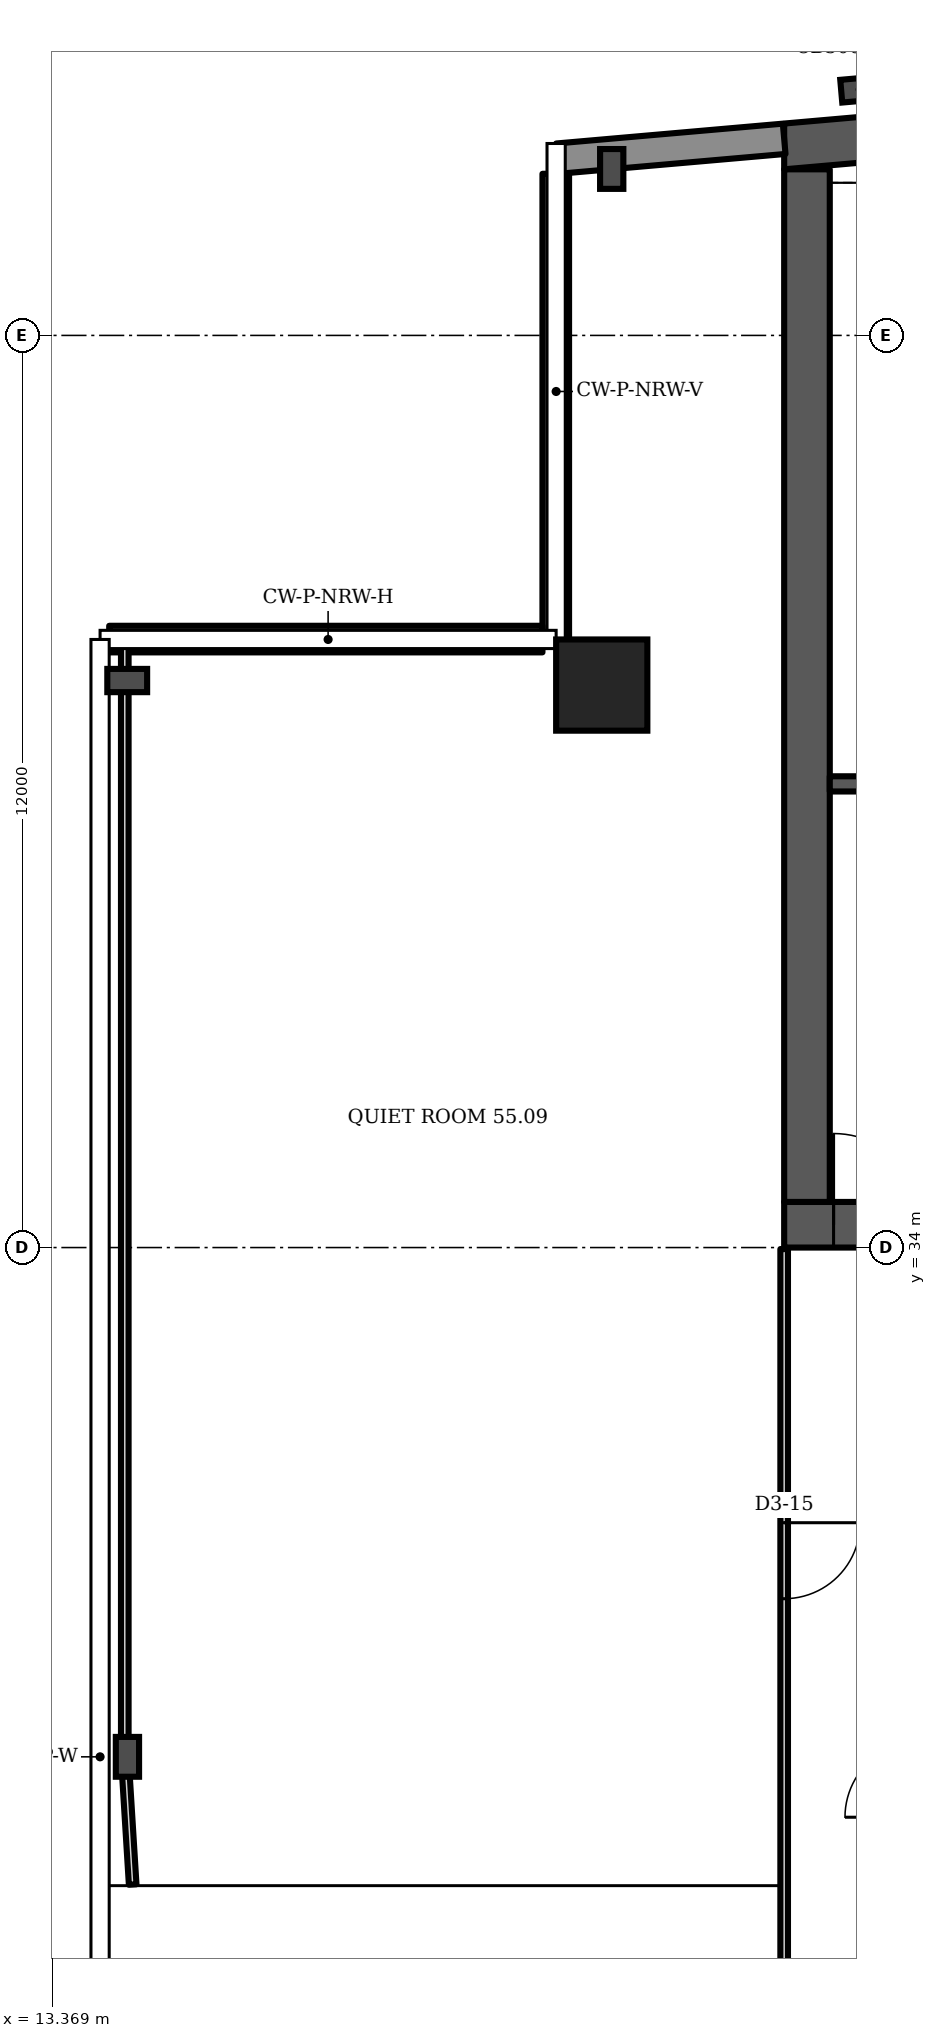
"""IFC4 building model, lengths in metres.
Left out: names, types, materials, properties, quantities, classifications, styles, units other than length and angle.
Written with IfcOpenShell. Run it as: python <this file> out.ifc"""

import sys

from ifc_helpers import new_model, si_unit, direction, frame, frame_2d, origin, origin_2d, place, context, subcontext, project, spatial, polyline, rectangle, i_section, outline, extrude, element, fill, save


model = new_model("IFC4")
c1 = context("Model", 3, precision=1e-05, world=origin(), true_north=direction((0.0, 1.0)))
c2 = subcontext(c1, "Body", "Model", "MODEL_VIEW")
j1 = project(units=[si_unit("LENGTHUNIT", "METRE"), si_unit("PLANEANGLEUNIT", "RADIAN")], contexts=[c1])
p1 = place(None, origin())
s1 = spatial("IfcSite", under=j1, at=p1, CompositionType="ELEMENT")
p2 = place(p1, origin())
s2 = spatial("IfcBuilding", under=s1, at=p2, CompositionType="ELEMENT")
p3 = place(p2, frame((0.0, 0.0, 221.5)))
s3 = spatial("IfcBuildingStorey", under=s2, at=p3, CompositionType="ELEMENT", Elevation=221.5)
p4 = place(p3, origin())
e1 = element("IfcWall", 1, at=p4, inside=s3, PredefinedType="SHEAR", context=c2, shape_type="SweptSolid", body=[
    extrude(outline(polyline([(23.0, 48.185), (40.5, 49.716), (58.0, 48.185), (58.0, 48.787), (40.5, 50.318), (23.0, 48.787), (23.0, 48.185)])), origin(), (0.0, 0.0, 1.0), 3.6),
])
p5 = place(p3, frame((23.0, 34.3, 0.0), z_axis=(0.0, 0.0, 1.0), x_axis=(1.0, 0.0, 0.0)))
e2 = element("IfcWall", 2, at=p5, inside=s3, PredefinedType="SHEAR", context=c2, shape_type="SweptSolid", body=[
    extrude(rectangle(XDim=35.0, YDim=0.6, at=frame_2d((17.5, 0.0))), origin(), (0.0, 0.0, 1.0), 3.6),
])
p6 = place(p5, frame((0.65, 0.0, 0.0)))
e3 = element("IfcOpeningElement", 3, at=p6, cuts=e2, PredefinedType="OPENING", context=c2, shape_type="SweptSolid", body=[
    extrude(rectangle(XDim=1.2, YDim=2.1, at=frame_2d((0.6, 1.05))), frame((0.0, 0.31, 0.0), z_axis=(0.0, -1.0, 0.0), x_axis=(1.0, 0.0, 0.0)), (0.0, 0.0, 1.0), 0.62),
])
p7 = place(p5, frame((7.717, 0.0, 0.0)))
e4 = element("IfcOpeningElement", 4, at=p7, cuts=e2, PredefinedType="OPENING", context=c2, shape_type="SweptSolid", body=[
    extrude(rectangle(XDim=1.1, YDim=2.1, at=frame_2d((0.55, 1.05))), frame((0.0, 0.31, 0.0), z_axis=(0.0, -1.0, 0.0), x_axis=(1.0, 0.0, 0.0)), (0.0, 0.0, 1.0), 0.62),
])
p8 = place(p5, frame((12.183, 0.0, 0.0)))
e5 = element("IfcOpeningElement", 5, at=p8, cuts=e2, PredefinedType="OPENING", context=c2, shape_type="SweptSolid", body=[
    extrude(rectangle(XDim=1.1, YDim=2.1, at=frame_2d((0.55, 1.05))), frame((0.0, 0.31, 0.0), z_axis=(0.0, -1.0, 0.0), x_axis=(1.0, 0.0, 0.0)), (0.0, 0.0, 1.0), 0.62),
])
p9 = place(p5, frame((9.8, 0.0, 0.0)))
e6 = element("IfcOpeningElement", 6, at=p9, cuts=e2, PredefinedType="OPENING", context=c2, shape_type="SweptSolid", body=[
    extrude(rectangle(XDim=1.4, YDim=2.1, at=frame_2d((0.7, 1.05))), frame((0.0, 0.31, 0.0), z_axis=(0.0, -1.0, 0.0), x_axis=(1.0, 0.0, 0.0)), (0.0, 0.0, 1.0), 0.62),
])
p10 = place(p5, frame((14.717, 0.0, 0.0)))
e7 = element("IfcOpeningElement", 7, at=p10, cuts=e2, PredefinedType="OPENING", context=c2, shape_type="SweptSolid", body=[
    extrude(rectangle(XDim=1.1, YDim=2.1, at=frame_2d((0.55, 1.05))), frame((0.0, 0.31, 0.0), z_axis=(0.0, -1.0, 0.0), x_axis=(1.0, 0.0, 0.0)), (0.0, 0.0, 1.0), 0.62),
])
p11 = place(p5, frame((16.95, 0.0, 0.0)))
e8 = element("IfcOpeningElement", 8, at=p11, cuts=e2, PredefinedType="OPENING", context=c2, shape_type="SweptSolid", body=[
    extrude(rectangle(XDim=1.1, YDim=2.1, at=frame_2d((0.55, 1.05))), frame((0.0, 0.31, 0.0), z_axis=(0.0, -1.0, 0.0), x_axis=(1.0, 0.0, 0.0)), (0.0, 0.0, 1.0), 0.62),
])
p12 = place(p5, frame((19.183, 0.0, 0.0)))
e9 = element("IfcOpeningElement", 9, at=p12, cuts=e2, PredefinedType="OPENING", context=c2, shape_type="SweptSolid", body=[
    extrude(rectangle(XDim=1.1, YDim=2.1, at=frame_2d((0.55, 1.05))), frame((0.0, 0.31, 0.0), z_axis=(0.0, -1.0, 0.0), x_axis=(1.0, 0.0, 0.0)), (0.0, 0.0, 1.0), 0.62),
])
p13 = place(p5, frame((26.15, 0.0, 0.0)))
e10 = element("IfcOpeningElement", 10, at=p13, cuts=e2, PredefinedType="OPENING", context=c2, shape_type="SweptSolid", body=[
    extrude(rectangle(XDim=1.2, YDim=2.1, at=frame_2d((0.6, 1.05))), frame((0.0, 0.31, 0.0), z_axis=(0.0, -1.0, 0.0), x_axis=(1.0, 0.0, 0.0)), (0.0, 0.0, 1.0), 0.62),
])
p14 = place(p5, frame((28.767, 0.0, 0.0)))
e11 = element("IfcOpeningElement", 11, at=p14, cuts=e2, PredefinedType="OPENING", context=c2, shape_type="SweptSolid", body=[
    extrude(rectangle(XDim=1.0, YDim=2.1, at=frame_2d((0.5, 1.05))), frame((0.0, 0.31, 0.0), z_axis=(0.0, -1.0, 0.0), x_axis=(1.0, 0.0, 0.0)), (0.0, 0.0, 1.0), 0.62),
])
p15 = place(p5, frame((33.083, 0.0, 0.0)))
e12 = element("IfcOpeningElement", 12, at=p15, cuts=e2, PredefinedType="OPENING", context=c2, shape_type="SweptSolid", body=[
    extrude(rectangle(XDim=1.0, YDim=2.1, at=frame_2d((0.5, 1.05))), frame((0.0, 0.31, 0.0), z_axis=(0.0, -1.0, 0.0), x_axis=(1.0, 0.0, 0.0)), (0.0, 0.0, 1.0), 0.62),
])
p16 = place(p5, frame((30.8, 0.0, 0.0)))
e13 = element("IfcOpeningElement", 13, at=p16, cuts=e2, PredefinedType="OPENING", context=c2, shape_type="SweptSolid", body=[
    extrude(rectangle(XDim=1.4, YDim=2.1, at=frame_2d((0.7, 1.05))), frame((0.0, 0.31, 0.0), z_axis=(0.0, -1.0, 0.0), x_axis=(1.0, 0.0, 0.0)), (0.0, 0.0, 1.0), 0.62),
])
p17 = place(p3, frame((23.3, 34.6, 0.0), z_axis=(0.0, 0.0, 1.0), x_axis=(0.0, 1.0, 0.0)))
e14 = element("IfcWall", 14, at=p17, inside=s3, PredefinedType="SHEAR", context=c2, shape_type="SweptSolid", body=[
    extrude(rectangle(XDim=13.585, YDim=0.6, at=frame_2d((6.792, 0.0))), origin(), (0.0, 0.0, 1.0), 3.6),
])
p18 = place(p3, frame((20.6, 41.4, 0.0), z_axis=(0.0, 0.0, 1.0), x_axis=(1.0, 0.0, 0.0)))
e15 = element("IfcColumn", 15, at=p18, inside=s3, PredefinedType="COLUMN", context=c2, shape_type="SweptSolid", body=[
    extrude(rectangle(XDim=1.2, YDim=1.2, at=origin_2d()), origin(), (0.0, 0.0, 1.0), 3.6),
])
for number, where, z_axis, x_axis in (
    (16, (20.731, 48.19, 0.0), (0.0, 0.0, 1.0), (-1.0, 0.0, 0.0)),
    (17, (14.357, 41.46, 0.0), (0.0, 0.0, 1.0), (0.0, 1.0, 0.0)),
    (18, (14.36, 27.3, 0.0), (0.0, 0.0, 1.0), (-1.0, 0.0, 0.0)),
):
    element("IfcColumn", number, at=place(p3, frame(where, z_axis=z_axis, x_axis=x_axis)), inside=s3, PredefinedType="COLUMN", context=c2, shape_type="SweptSolid", body=[
        extrude(i_section(OverallWidth=0.306, OverallDepth=0.524, WebThickness=0.021, FlangeThickness=0.04, FilletRadius=0.027, at=origin_2d()), origin(), (0.0, 0.0, 1.0), 3.6),
    ])
p19 = place(p3, frame((24.0, 49.235, 0.0), z_axis=(0.0, 0.0, 1.0), x_axis=(-0.087156, 0.996197, 0.0)))
e19 = element("IfcColumn", 19, at=p19, inside=s3, PredefinedType="COLUMN", context=c2, shape_type="SweptSolid", body=[
    extrude(i_section(OverallWidth=0.3, OverallDepth=0.5, WebThickness=0.014, FlangeThickness=0.028, FilletRadius=0.027, at=origin_2d()), origin(), (0.0, 0.0, 1.0), 3.6),
])
p20 = place(p3, frame((23.0, 48.587, 0.0), z_axis=(0.0, 0.0, 1.0), x_axis=(-0.996194, -0.087168, 0.0)))
e20 = element("IfcWall", 20, at=p20, inside=s3, PredefinedType="SOLIDWALL", context=c2, shape_type="SweptSolid", body=[
    extrude(rectangle(XDim=2.994, YDim=0.4, at=frame_2d((1.497, 0.0))), origin(), (0.0, 0.0, 1.0), 3.2),
])
p21 = place(p3, frame((19.995, 48.126, 0.0), z_axis=(0.0, 0.0, 1.0), x_axis=(0.0, -1.0, 0.0)))
e21 = element("IfcWall", 21, at=p21, inside=s3, PredefinedType="SOLIDWALL", context=c2, shape_type="SweptSolid", body=[
    extrude(rectangle(XDim=6.126, YDim=0.35, at=frame_2d((3.063, 0.0))), origin(), (0.0, 0.0, 1.0), 1.0),
])
p22 = place(p3, frame((19.82, 42.005, 0.0), z_axis=(0.0, 0.0, 1.0), x_axis=(-1.0, 0.0, 0.0)))
e22 = element("IfcWall", 22, at=p22, inside=s3, PredefinedType="SOLIDWALL", context=c2, shape_type="SweptSolid", body=[
    extrude(rectangle(XDim=5.7, YDim=0.35, at=frame_2d((2.85, 0.0))), origin(), (0.0, 0.0, 1.0), 1.0),
])
p23 = place(p3, frame((23.6, 40.1, 0.0), z_axis=(0.0, 0.0, 1.0), x_axis=(1.0, 0.0, 0.0)))
e23 = element("IfcWall", 23, at=p23, inside=s3, PredefinedType="SHEAR", context=c2, shape_type="SweptSolid", body=[
    extrude(rectangle(XDim=6.1, YDim=0.2, at=frame_2d((3.05, 0.0))), origin(), (0.0, 0.0, 1.0), 3.2),
])
p24 = place(p23, frame((3.325, 0.0, 0.0)))
e24 = element("IfcOpeningElement", 24, at=p24, cuts=e23, PredefinedType="OPENING", context=c2, shape_type="SweptSolid", body=[
    extrude(rectangle(XDim=1.2, YDim=2.1, at=frame_2d((0.6, 1.05))), frame((0.0, 0.11, 0.0), z_axis=(0.0, -1.0, 0.0), x_axis=(1.0, 0.0, 0.0)), (0.0, 0.0, 1.0), 0.22),
])
p25 = place(p23, frame((0.475, 0.0, 0.0)))
e25 = element("IfcOpeningElement", 25, at=p25, cuts=e23, PredefinedType="OPENING", context=c2, shape_type="SweptSolid", body=[
    extrude(rectangle(XDim=0.9, YDim=2.1, at=frame_2d((0.45, 1.05))), frame((0.0, 0.11, 0.0), z_axis=(0.0, -1.0, 0.0), x_axis=(1.0, 0.0, 0.0)), (0.0, 0.0, 1.0), 0.22),
])
p26 = place(p3, frame((14.325, 27.3, 0.0), z_axis=(0.0, 0.0, 1.0), x_axis=(0.0, 1.0, 0.0)))
e26 = element("IfcWall", 26, at=p26, inside=s3, PredefinedType="PARTITIONING", context=c2, shape_type="SweptSolid", body=[
    extrude(rectangle(XDim=14.68, YDim=0.1, at=frame_2d((7.34, 0.0))), origin(), (0.0, 0.0, 1.0), 2.58),
])
p27 = place(p3, frame((14.429, 25.62, 0.0), z_axis=(0.0, 0.0, 1.0), x_axis=(-0.061647, 0.998101, 0.0)))
e27 = element("IfcWall", 27, at=p27, inside=s3, PredefinedType="PARTITIONING", context=c2, shape_type="SweptSolid", body=[
    extrude(rectangle(XDim=1.683, YDim=0.1, at=frame_2d((0.842, 0.0))), origin(), (0.0, 0.0, 1.0), 2.58),
])
p28 = place(p3, frame((23.0, 24.275, 0.0), z_axis=(0.0, 0.0, 1.0), x_axis=(0.0, 1.0, 0.0)))
e28 = element("IfcWall", 28, at=p28, inside=s3, PredefinedType="PARTITIONING", context=c2, shape_type="SweptSolid", body=[
    extrude(rectangle(XDim=9.705, YDim=0.1, at=frame_2d((4.853, 0.0))), origin(), (0.0, 0.0, 1.0), 3.2),
])
p29 = place(p28, frame((5.105, 0.0, 0.0)))
e29 = element("IfcOpeningElement", 29, at=p29, cuts=e28, PredefinedType="OPENING", context=c2, shape_type="SweptSolid", body=[
    extrude(rectangle(XDim=1.0, YDim=2.1, at=frame_2d((0.5, 1.05))), frame((0.0, 0.06, 0.0), z_axis=(0.0, -1.0, 0.0), x_axis=(1.0, 0.0, 0.0)), (0.0, 0.0, 1.0), 0.12),
])
p30 = place(p6, origin())
e30 = element("IfcDoor", 30, at=p30, inside=s3, OperationType="SINGLE_SWING_LEFT", PredefinedType="DOOR", context=c2, shape_type="SweptSolid", body=[
    extrude(rectangle(XDim=1.2, YDim=2.1, at=frame_2d((0.6, 1.05))), frame((0.0, 0.025, 0.0), z_axis=(0.0, -1.0, 0.0), x_axis=(1.0, 0.0, 0.0)), (0.0, 0.0, 1.0), 0.05),
])
fill(e3, e30)
p31 = place(p29, origin())
e31 = element("IfcDoor", 31, at=p31, inside=s3, OperationType="SINGLE_SWING_RIGHT", PredefinedType="DOOR", context=c2, shape_type="SweptSolid", body=[
    extrude(rectangle(XDim=1.0, YDim=2.1, at=frame_2d((0.5, 1.05))), frame((0.0, 0.025, 0.0), z_axis=(0.0, -1.0, 0.0), x_axis=(1.0, 0.0, 0.0)), (0.0, 0.0, 1.0), 0.05),
])
fill(e29, e31)
save(model, sys.argv[1])
